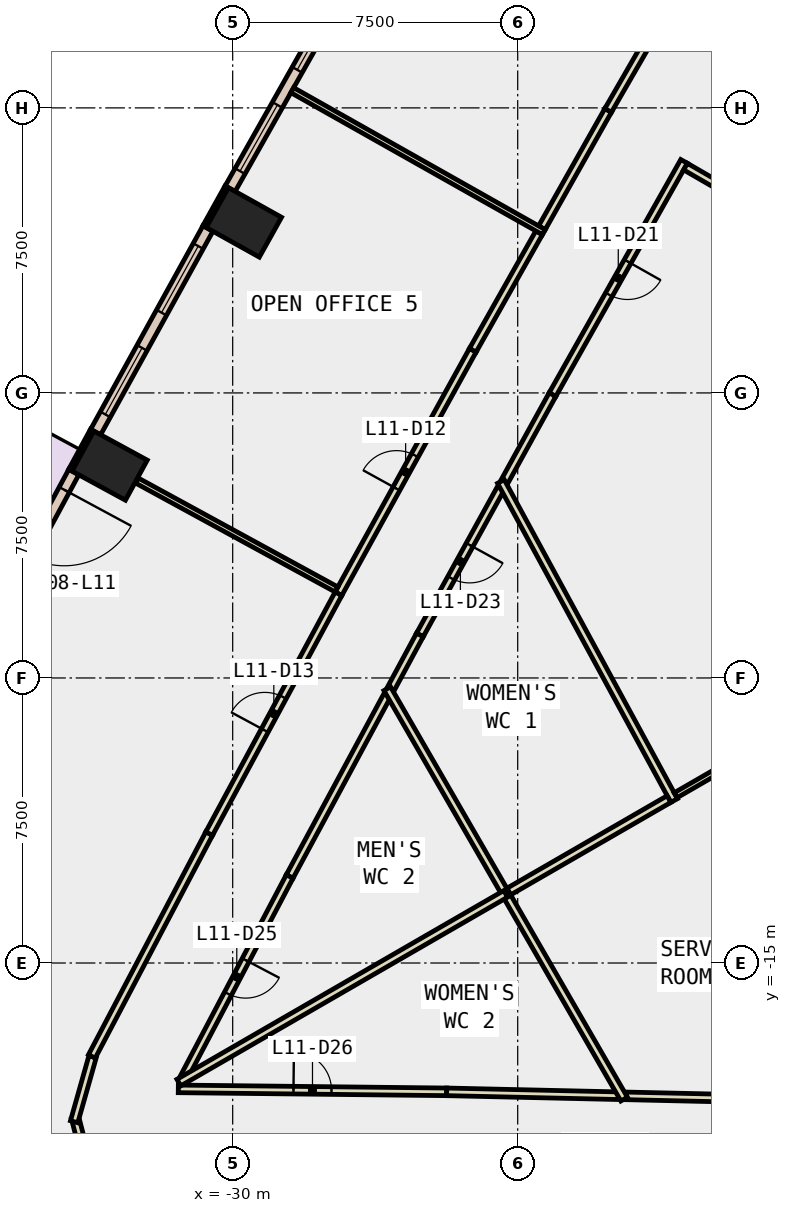
"""IFC4 building model, lengths in metres.
Left out: names, types, materials, properties, quantities, classifications, styles, units other than length and angle.
Written with IfcOpenShell. Run it as: python <this file> out.ifc"""

import sys

from ifc_helpers import new_model, si_unit, direction, frame, frame_2d, origin, origin_2d, place, context, subcontext, project, spatial, rectangle, extrude, element, fill, save


model = new_model("IFC4")
c1 = context("Model", 3, precision=1e-05, world=origin(), true_north=direction((0.0, 1.0)))
c2 = subcontext(c1, "Body", "Model", "MODEL_VIEW")
j1 = project(units=[si_unit("LENGTHUNIT", "METRE"), si_unit("PLANEANGLEUNIT", "RADIAN")], contexts=[c1])
p1 = place(None, origin())
s1 = spatial("IfcSite", under=j1, at=p1, CompositionType="ELEMENT")
p2 = place(p1, origin())
s2 = spatial("IfcBuilding", under=s1, at=p2, CompositionType="ELEMENT")
p3 = place(p2, frame((0.0, 0.0, 56.0)))
s3 = spatial("IfcBuildingStorey", under=s2, at=p3, CompositionType="ELEMENT", Elevation=56.0)
for number, where, z_axis, x_axis in (
    (1, (-29.706, 4.487, -0.4), (0.0, 0.0, 1.0), (0.487, 0.873, 0.0)),
    (2, (-33.238, -1.913, -0.4), (0.0, 0.0, 1.0), (0.478, 0.878, 0.0)),
):
    element("IfcColumn", number, at=place(p3, frame(where, z_axis=z_axis, x_axis=x_axis)), inside=s3, PredefinedType="COLUMN", context=c2, shape_type="SweptSolid", body=[
        extrude(rectangle(XDim=1.2, YDim=1.6, at=origin_2d()), origin(), (0.0, 0.0, 1.0), 4.2),
    ])
p4 = place(p3, frame((-30.156, 5.425, 0.0), z_axis=(0.0, 0.0, 1.0), x_axis=(-0.486730996044, -0.87355190887, 0.0)))
e3 = element("IfcWall", 3, at=p4, inside=s3, PredefinedType="STANDARD", context=c2, shape_type="SweptSolid", body=[
    extrude(rectangle(XDim=1.2, YDim=0.1, at=frame_2d((0.6, 0.0))), origin(), (0.0, 0.0, 1.0), 3.8),
])
p5 = place(p3, frame((-33.697, -0.98, 0.0), z_axis=(0.0, 0.0, 1.0), x_axis=(-0.478267644701, -0.878214131082, 0.0)))
e4 = element("IfcWall", 4, at=p5, inside=s3, PredefinedType="STANDARD", context=c2, shape_type="SweptSolid", body=[
    extrude(rectangle(XDim=1.2, YDim=0.1, at=frame_2d((0.6, 0.0))), origin(), (0.0, 0.0, 1.0), 3.8),
])
p6 = place(p3, frame((-27.058, 10.705, 0.0), z_axis=(0.0, 0.0, 1.0), x_axis=(-0.49151046248, -0.870871669807, 0.0)))
e5 = element("IfcWall", 5, at=p6, inside=s3, PredefinedType="STANDARD", context=c2, shape_type="SweptSolid", body=[
    extrude(rectangle(XDim=6.122, YDim=0.3, at=frame_2d((3.061, 0.0))), origin(), (0.0, 0.0, 1.0), 3.8),
])
p7 = place(p6, frame((0.53, 0.0, 0.9)))
e6 = element("IfcOpeningElement", 6, at=p7, cuts=e5, PredefinedType="OPENING", context=c2, shape_type="SweptSolid", body=[
    extrude(rectangle(XDim=2.0, YDim=2.6, at=frame_2d((1.0, 1.3))), frame((0.0, 0.16, 0.0), z_axis=(0.0, -1.0, 0.0), x_axis=(1.0, 0.0, 0.0)), (0.0, 0.0, 1.0), 0.32),
])
p8 = place(p6, frame((3.591, 0.0, 0.9)))
e7 = element("IfcOpeningElement", 7, at=p8, cuts=e5, PredefinedType="OPENING", context=c2, shape_type="SweptSolid", body=[
    extrude(rectangle(XDim=2.0, YDim=2.6, at=frame_2d((1.0, 1.3))), frame((0.0, 0.16, 0.0), z_axis=(0.0, -1.0, 0.0), x_axis=(1.0, 0.0, 0.0)), (0.0, 0.0, 1.0), 0.32),
])
p9 = place(p3, frame((-30.65, 4.328, 0.0), z_axis=(0.0, 0.0, 1.0), x_axis=(-0.483195456594, -0.875512507465, 0.0)))
e8 = element("IfcWall", 8, at=p9, inside=s3, PredefinedType="STANDARD", context=c2, shape_type="SweptSolid", body=[
    extrude(rectangle(XDim=6.12, YDim=0.3, at=frame_2d((3.06, 0.0))), origin(), (0.0, 0.0, 1.0), 3.8),
])
p10 = place(p9, frame((0.53, 0.0, 0.9)))
e9 = element("IfcOpeningElement", 9, at=p10, cuts=e8, PredefinedType="OPENING", context=c2, shape_type="SweptSolid", body=[
    extrude(rectangle(XDim=2.0, YDim=2.6, at=frame_2d((1.0, 1.3))), frame((0.0, 0.16, 0.0), z_axis=(0.0, -1.0, 0.0), x_axis=(1.0, 0.0, 0.0)), (0.0, 0.0, 1.0), 0.32),
])
p11 = place(p9, frame((3.59, 0.0, 0.9)))
e10 = element("IfcOpeningElement", 10, at=p11, cuts=e8, PredefinedType="OPENING", context=c2, shape_type="SweptSolid", body=[
    extrude(rectangle(XDim=2.0, YDim=2.6, at=frame_2d((1.0, 1.3))), frame((0.0, 0.16, 0.0), z_axis=(0.0, -1.0, 0.0), x_axis=(1.0, 0.0, 0.0)), (0.0, 0.0, 1.0), 0.32),
])
p12 = place(p3, frame((-34.181, -2.082, 0.0), z_axis=(0.0, 0.0, 1.0), x_axis=(-0.474584950749, -0.880209704856, 0.0)))
e11 = element("IfcWall", 11, at=p12, inside=s3, PredefinedType="STANDARD", context=c2, shape_type="SweptSolid", body=[
    extrude(rectangle(XDim=6.121, YDim=0.3, at=frame_2d((3.061, 0.0))), origin(), (0.0, 0.0, 1.0), 3.8),
])
p13 = place(p12, frame((0.53, 0.0, 0.0)))
e12 = element("IfcOpeningElement", 12, at=p13, cuts=e11, PredefinedType="OPENING", context=c2, shape_type="SweptSolid", body=[
    extrude(rectangle(XDim=2.0, YDim=2.4, at=frame_2d((1.0, 1.2))), frame((0.0, 0.16, 0.0), z_axis=(0.0, -1.0, 0.0), x_axis=(1.0, 0.0, 0.0)), (0.0, 0.0, 1.0), 0.32),
])
p14 = place(p12, frame((3.591, 0.0, 0.9)))
e13 = element("IfcOpeningElement", 13, at=p14, cuts=e11, PredefinedType="OPENING", context=c2, shape_type="SweptSolid", body=[
    extrude(rectangle(XDim=2.0, YDim=2.6, at=frame_2d((1.0, 1.3))), frame((0.0, 0.16, 0.0), z_axis=(0.0, -1.0, 0.0), x_axis=(1.0, 0.0, 0.0)), (0.0, 0.0, 1.0), 0.32),
])
p15 = place(p3, frame((-18.122, 6.092, 0.0), z_axis=(0.0, 0.0, 1.0), x_axis=(-0.491430359405, -0.870916874251, 0.0)))
e14 = element("IfcWall", 14, at=p15, inside=s3, PredefinedType="PARTITIONING", context=c2, shape_type="SweptSolid", body=[
    extrude(rectangle(XDim=7.047, YDim=0.2, at=frame_2d((3.523, 0.0))), origin(), (0.0, 0.0, 1.0), 3.8),
])
p16 = place(p15, frame((3.024, 0.0, 0.0)))
e15 = element("IfcOpeningElement", 15, at=p16, cuts=e14, PredefinedType="OPENING", context=c2, shape_type="SweptSolid", body=[
    extrude(rectangle(XDim=1.0, YDim=2.1, at=frame_2d((0.5, 1.05))), frame((0.0, 0.11, 0.0), z_axis=(0.0, -1.0, 0.0), x_axis=(1.0, 0.0, 0.0)), (0.0, 0.0, 1.0), 0.22),
])
p17 = place(p3, frame((-21.585, -0.045, 0.0), z_axis=(0.0, 0.0, 1.0), x_axis=(-0.483139162319, -0.875543573921, 0.0)))
e16 = element("IfcWall", 16, at=p17, inside=s3, PredefinedType="PARTITIONING", context=c2, shape_type="SweptSolid", body=[
    extrude(rectangle(XDim=2.61, YDim=0.2, at=frame_2d((1.305, 0.0))), origin(), (0.0, 0.0, 1.0), 3.8),
])
p18 = place(p3, frame((-22.942, -2.505, 0.0), z_axis=(0.0, 0.0, 1.0), x_axis=(-0.48320751977, -0.875505849688, 0.0)))
e17 = element("IfcWall", 17, at=p18, inside=s3, PredefinedType="PARTITIONING", context=c2, shape_type="SweptSolid", body=[
    extrude(rectangle(XDim=4.412, YDim=0.2, at=frame_2d((2.206, 0.0))), origin(), (0.0, 0.0, 1.0), 3.8),
])
p19 = place(p18, frame((1.706, 0.0, 0.0)))
e18 = element("IfcOpeningElement", 18, at=p19, cuts=e17, PredefinedType="OPENING", context=c2, shape_type="SweptSolid", body=[
    extrude(rectangle(XDim=1.0, YDim=2.1, at=frame_2d((0.5, 1.05))), frame((0.0, 0.11, 0.0), z_axis=(0.0, -1.0, 0.0), x_axis=(1.0, 0.0, 0.0)), (0.0, 0.0, 1.0), 0.22),
])
p20 = place(p3, frame((-25.074, -6.368, 0.0), z_axis=(0.0, 0.0, 1.0), x_axis=(-0.474616646546, -0.880192614614, 0.0)))
e19 = element("IfcWall", 19, at=p20, inside=s3, PredefinedType="PARTITIONING", context=c2, shape_type="SweptSolid", body=[
    extrude(rectangle(XDim=1.605, YDim=0.2, at=frame_2d((0.803, 0.0))), origin(), (0.0, 0.0, 1.0), 3.8),
])
p21 = place(p3, frame((-19.649, -18.496, 0.0), z_axis=(0.0, 0.0, 1.0), x_axis=(0.999744980574, -0.02258259988, 0.0)))
e20 = element("IfcWall", 20, at=p21, inside=s3, PredefinedType="PARTITIONING", context=c2, shape_type="SweptSolid", body=[
    extrude(rectangle(XDim=3.676, YDim=0.2, at=frame_2d((1.838, 0.0))), origin(), (0.0, 0.0, 1.0), 3.8),
])
p22 = place(p3, frame((-25.931, -7.957, 0.0), z_axis=(0.0, 0.0, 1.0), x_axis=(-0.474554072379, -0.880226352928, 0.0)))
e21 = element("IfcWall", 21, at=p22, inside=s3, PredefinedType="PARTITIONING", context=c2, shape_type="SweptSolid", body=[
    extrude(rectangle(XDim=5.416, YDim=0.2, at=frame_2d((2.708, 0.0))), origin(), (0.0, 0.0, 1.0), 3.8),
])
p23 = place(p3, frame((-28.501, -12.724, 0.0), z_axis=(0.0, 0.0, 1.0), x_axis=(-0.465933418625, -0.884819783576, 0.0)))
e22 = element("IfcWall", 22, at=p23, inside=s3, PredefinedType="PARTITIONING", context=c2, shape_type="SweptSolid", body=[
    extrude(rectangle(XDim=5.973, YDim=0.2, at=frame_2d((2.986, 0.0))), origin(), (0.0, 0.0, 1.0), 3.8),
])
p24 = place(p23, frame((2.486, 0.0, 0.0)))
e23 = element("IfcOpeningElement", 23, at=p24, cuts=e22, PredefinedType="OPENING", context=c2, shape_type="SweptSolid", body=[
    extrude(rectangle(XDim=1.0, YDim=2.1, at=frame_2d((0.5, 1.05))), frame((0.0, 0.11, 0.0), z_axis=(0.0, -1.0, 0.0), x_axis=(1.0, 0.0, 0.0)), (0.0, 0.0, 1.0), 0.22),
])
p25 = place(p3, frame((-31.431, -18.312, 0.0), z_axis=(0.0, 0.0, 1.0), x_axis=(0.999939195602, -0.011027470214, 0.0)))
e24 = element("IfcWall", 24, at=p25, inside=s3, PredefinedType="PARTITIONING", context=c2, shape_type="SweptSolid", body=[
    extrude(rectangle(XDim=7.062, YDim=0.2, at=frame_2d((3.531, 0.0))), origin(), (0.0, 0.0, 1.0), 3.8),
])
p26 = place(p25, frame((3.031, 0.0, 0.0)))
e25 = element("IfcOpeningElement", 25, at=p26, cuts=e24, PredefinedType="OPENING", context=c2, shape_type="SweptSolid", body=[
    extrude(rectangle(XDim=1.0, YDim=2.1, at=frame_2d((0.5, 1.05))), frame((0.0, 0.11, 0.0), z_axis=(0.0, -1.0, 0.0), x_axis=(1.0, 0.0, 0.0)), (0.0, 0.0, 1.0), 0.22),
])
p27 = place(p3, frame((-24.369, -18.39, 0.0), z_axis=(0.0, 0.0, 1.0), x_axis=(0.99974519793, -0.022572975354, 0.0)))
e26 = element("IfcWall", 26, at=p27, inside=s3, PredefinedType="PARTITIONING", context=c2, shape_type="SweptSolid", body=[
    extrude(rectangle(XDim=4.521, YDim=0.2, at=frame_2d((2.26, 0.0))), origin(), (0.0, 0.0, 1.0), 3.8),
])
p28 = place(p3, frame((-21.863, 4.345, 0.0), z_axis=(0.0, 0.0, 1.0), x_axis=(0.491394823876, 0.87093692485, 0.0)))
e27 = element("IfcWall", 27, at=p28, inside=s3, PredefinedType="PARTITIONING", context=c2, shape_type="SweptSolid", body=[
    extrude(rectangle(XDim=3.547, YDim=0.2, at=frame_2d((1.773, 0.0))), origin(), (0.0, 0.0, 1.0), 3.8),
])
p29 = place(p3, frame((-20.12, 7.434, 0.0), z_axis=(0.0, 0.0, 1.0), x_axis=(0.500039488902, 0.866002603656, 0.0)))
e28 = element("IfcWall", 28, at=p29, inside=s3, PredefinedType="PARTITIONING", context=c2, shape_type="SweptSolid", body=[
    extrude(rectangle(XDim=7.244, YDim=0.2, at=frame_2d((3.622, 0.0))), origin(), (0.0, 0.0, 1.0), 3.8),
])
p30 = place(p29, frame((3.122, 0.0, 0.0)))
e29 = element("IfcOpeningElement", 29, at=p30, cuts=e28, PredefinedType="OPENING", context=c2, shape_type="SweptSolid", body=[
    extrude(rectangle(XDim=1.0, YDim=2.1, at=frame_2d((0.5, 1.05))), frame((0.0, 0.11, 0.0), z_axis=(0.0, -1.0, 0.0), x_axis=(1.0, 0.0, 0.0)), (0.0, 0.0, 1.0), 0.22),
])
p31 = place(p3, frame((-27.217, -5.284, 0.0), z_axis=(0.0, 0.0, 1.0), x_axis=(0.483151415114, 0.875536812517, 0.0)))
e30 = element("IfcWall", 30, at=p31, inside=s3, PredefinedType="PARTITIONING", context=c2, shape_type="SweptSolid", body=[
    extrude(rectangle(XDim=7.319, YDim=0.2, at=frame_2d((3.659, 0.0))), origin(), (0.0, 0.0, 1.0), 3.8),
])
p32 = place(p31, frame((3.159, 0.0, 0.0)))
e31 = element("IfcOpeningElement", 31, at=p32, cuts=e30, PredefinedType="OPENING", context=c2, shape_type="SweptSolid", body=[
    extrude(rectangle(XDim=1.0, YDim=2.1, at=frame_2d((0.5, 1.05))), frame((0.0, 0.11, 0.0), z_axis=(0.0, -1.0, 0.0), x_axis=(1.0, 0.0, 0.0)), (0.0, 0.0, 1.0), 0.22),
])
p33 = place(p3, frame((-23.681, 1.124, 0.0), z_axis=(0.0, 0.0, 1.0), x_axis=(0.491485799319, 0.870885588965, 0.0)))
e32 = element("IfcWall", 32, at=p33, inside=s3, PredefinedType="PARTITIONING", context=c2, shape_type="SweptSolid", body=[
    extrude(rectangle(XDim=3.548, YDim=0.2, at=frame_2d((1.774, 0.0))), origin(), (0.0, 0.0, 1.0), 3.8),
])
p34 = place(p3, frame((-33.521, -20.105, 0.0), z_axis=(0.0, 0.0, 1.0), x_axis=(-0.713535335808, 0.700619243636, 0.0)))
e33 = element("IfcWall", 33, at=p34, inside=s3, PredefinedType="PARTITIONING", context=c2, shape_type="SweptSolid", body=[
    extrude(rectangle(XDim=0.775, YDim=0.2, at=frame_2d((0.387, 0.0))), origin(), (0.0, 0.0, 1.0), 3.8),
])
p35 = place(p3, frame((-34.003, -19.631, 0.0), z_axis=(0.0, 0.0, 1.0), x_axis=(-0.250111961061, 0.968216921425, 0.0)))
e34 = element("IfcWall", 34, at=p35, inside=s3, PredefinedType="PARTITIONING", context=c2, shape_type="SweptSolid", body=[
    extrude(rectangle(XDim=0.568, YDim=0.2, at=frame_2d((0.284, 0.0))), origin(), (0.0, 0.0, 1.0), 3.8),
])
p36 = place(p3, frame((-34.172, -19.177, 0.0), z_axis=(0.0, 0.0, 1.0), x_axis=(0.272780480932, 0.962076301144, 0.0)))
e35 = element("IfcWall", 35, at=p36, inside=s3, PredefinedType="PARTITIONING", context=c2, shape_type="SweptSolid", body=[
    extrude(rectangle(XDim=1.778, YDim=0.2, at=frame_2d((0.889, 0.0))), origin(), (0.0, 0.0, 1.0), 3.8),
])
p37 = place(p3, frame((-33.706, -17.458, 0.0), z_axis=(0.0, 0.0, 1.0), x_axis=(0.465905874098, 0.884834287582, 0.0)))
e36 = element("IfcWall", 36, at=p37, inside=s3, PredefinedType="PARTITIONING", context=c2, shape_type="SweptSolid", body=[
    extrude(rectangle(XDim=6.626, YDim=0.2, at=frame_2d((3.313, 0.0))), origin(), (0.0, 0.0, 1.0), 3.8),
])
p38 = place(p3, frame((-30.619, -11.595, 0.0), z_axis=(0.0, 0.0, 1.0), x_axis=(0.474595197669, 0.880204179921, 0.0)))
e37 = element("IfcWall", 37, at=p38, inside=s3, PredefinedType="PARTITIONING", context=c2, shape_type="SweptSolid", body=[
    extrude(rectangle(XDim=7.17, YDim=0.2, at=frame_2d((3.585, 0.0))), origin(), (0.0, 0.0, 1.0), 3.8),
])
p39 = place(p38, frame((3.085, 0.0, 0.0)))
e38 = element("IfcOpeningElement", 38, at=p39, cuts=e37, PredefinedType="OPENING", context=c2, shape_type="SweptSolid", body=[
    extrude(rectangle(XDim=1.0, YDim=2.1, at=frame_2d((0.5, 1.05))), frame((0.0, 0.11, 0.0), z_axis=(0.0, -1.0, 0.0), x_axis=(1.0, 0.0, 0.0)), (0.0, 0.0, 1.0), 0.22),
])
p40 = place(p3, frame((-18.384, -10.725, 0.0), z_axis=(0.0, 0.0, 1.0), x_axis=(-0.477137547132, 0.878828630119, 0.0)))
e39 = element("IfcWall", 39, at=p40, inside=s3, PredefinedType="PARTITIONING", context=c2, shape_type="SweptSolid", body=[
    extrude(rectangle(XDim=9.552, YDim=0.2, at=frame_2d((4.776, 0.0))), origin(), (0.0, 0.0, 1.0), 3.8),
])
p41 = place(p3, frame((-17.033, -9.829, 0.0), z_axis=(0.0, 0.0, 1.0), x_axis=(-0.866094414679, -0.49988045057, 0.0)))
e40 = element("IfcWall", 40, at=p41, inside=s3, PredefinedType="PARTITIONING", context=c2, shape_type="SweptSolid", body=[
    extrude(rectangle(XDim=1.516, YDim=0.15, at=frame_2d((0.758, 0.0))), origin(), (0.0, 0.0, 1.0), 3.8),
])
p42 = place(p3, frame((-18.519, -10.687, 0.0), z_axis=(0.0, 0.0, 1.0), x_axis=(-0.866063668779, -0.499933717229, 0.0)))
e41 = element("IfcWall", 41, at=p42, inside=s3, PredefinedType="PARTITIONING", context=c2, shape_type="SweptSolid", body=[
    extrude(rectangle(XDim=4.969, YDim=0.2, at=frame_2d((2.484, 0.0))), origin(), (0.0, 0.0, 1.0), 3.8),
])
p43 = place(p3, frame((-22.822, -13.171, 0.0), z_axis=(0.0, 0.0, 1.0), x_axis=(-0.499974913987, 0.866039886717, 0.0)))
e42 = element("IfcWall", 42, at=p43, inside=s3, PredefinedType="PARTITIONING", context=c2, shape_type="SweptSolid", body=[
    extrude(rectangle(XDim=6.222, YDim=0.2, at=frame_2d((3.111, 0.0))), origin(), (0.0, 0.0, 1.0), 3.8),
])
p44 = place(p3, frame((-19.699, -18.581, 0.0), z_axis=(0.0, 0.0, 1.0), x_axis=(-0.499899838407, 0.866083224385, 0.0)))
e43 = element("IfcWall", 43, at=p44, inside=s3, PredefinedType="PARTITIONING", context=c2, shape_type="SweptSolid", body=[
    extrude(rectangle(XDim=6.235, YDim=0.2, at=frame_2d((3.118, 0.0))), origin(), (0.0, 0.0, 1.0), 3.8),
])
p45 = place(p3, frame((-22.816, -13.181, 0.0), z_axis=(0.0, 0.0, 1.0), x_axis=(-0.86601529143, -0.500017514703, 0.0)))
e44 = element("IfcWall", 44, at=p45, inside=s3, PredefinedType="PARTITIONING", context=c2, shape_type="SweptSolid", body=[
    extrude(rectangle(XDim=9.932, YDim=0.2, at=frame_2d((4.966, 0.0))), origin(), (0.0, 0.0, 1.0), 3.8),
])
p46 = place(p3, frame((-21.813, 4.231, 0.0), z_axis=(0.0, 0.0, 1.0), x_axis=(-0.870901264369, 0.491458022337, 0.0)))
e45 = element("IfcWall", 45, at=p46, inside=s3, PredefinedType="PARTITIONING", context=c2, shape_type="SweptSolid", body=[
    extrude(rectangle(XDim=7.6, YDim=0.15, at=frame_2d((3.8, 0.0))), origin(), (0.0, 0.0, 1.0), 3.8),
])
p47 = place(p3, frame((-27.268, -5.171, 0.0), z_axis=(0.0, 0.0, 1.0), x_axis=(-0.877837854343, 0.478957932895, 0.0)))
e46 = element("IfcWall", 46, at=p47, inside=s3, PredefinedType="PARTITIONING", context=c2, shape_type="SweptSolid", body=[
    extrude(rectangle(XDim=5.982, YDim=0.15, at=frame_2d((2.991, 0.0))), origin(), (0.0, 0.0, 1.0), 3.8),
])
p48 = place(p3, frame((-13.85, 3.51, 0.0), z_axis=(0.0, 0.0, 1.0), x_axis=(-0.865969361037, 0.500097056325, 0.0)))
e47 = element("IfcWall", 47, at=p48, inside=s3, PredefinedType="PARTITIONING", context=c2, shape_type="SweptSolid", body=[
    extrude(rectangle(XDim=4.889, YDim=0.2, at=frame_2d((2.445, 0.0))), origin(), (0.0, 0.0, 1.0), 3.8),
])
p49 = place(p7, origin())
e48 = element("IfcWindow", 48, at=p49, inside=s3, PartitioningType="SINGLE_PANEL", PredefinedType="WINDOW", context=c2, shape_type="SweptSolid", body=[
    extrude(rectangle(XDim=2.0, YDim=2.6, at=frame_2d((1.0, 1.3))), frame((0.0, 0.03, 0.0), z_axis=(0.0, -1.0, 0.0), x_axis=(1.0, 0.0, 0.0)), (0.0, 0.0, 1.0), 0.06),
])
fill(e6, e48)
p50 = place(p8, origin())
e49 = element("IfcWindow", 49, at=p50, inside=s3, PartitioningType="SINGLE_PANEL", PredefinedType="WINDOW", context=c2, shape_type="SweptSolid", body=[
    extrude(rectangle(XDim=2.0, YDim=2.6, at=frame_2d((1.0, 1.3))), frame((0.0, 0.03, 0.0), z_axis=(0.0, -1.0, 0.0), x_axis=(1.0, 0.0, 0.0)), (0.0, 0.0, 1.0), 0.06),
])
fill(e7, e49)
p51 = place(p10, origin())
e50 = element("IfcWindow", 50, at=p51, inside=s3, PartitioningType="SINGLE_PANEL", PredefinedType="WINDOW", context=c2, shape_type="SweptSolid", body=[
    extrude(rectangle(XDim=2.0, YDim=2.6, at=frame_2d((1.0, 1.3))), frame((0.0, 0.03, 0.0), z_axis=(0.0, -1.0, 0.0), x_axis=(1.0, 0.0, 0.0)), (0.0, 0.0, 1.0), 0.06),
])
fill(e9, e50)
p52 = place(p11, origin())
e51 = element("IfcWindow", 51, at=p52, inside=s3, PartitioningType="SINGLE_PANEL", PredefinedType="WINDOW", context=c2, shape_type="SweptSolid", body=[
    extrude(rectangle(XDim=2.0, YDim=2.6, at=frame_2d((1.0, 1.3))), frame((0.0, 0.03, 0.0), z_axis=(0.0, -1.0, 0.0), x_axis=(1.0, 0.0, 0.0)), (0.0, 0.0, 1.0), 0.06),
])
fill(e10, e51)
p53 = place(p13, origin())
e52 = element("IfcDoor", 52, at=p53, inside=s3, OperationType="SLIDING_TO_LEFT", PredefinedType="DOOR", context=c2, shape_type="SweptSolid", body=[
    extrude(rectangle(XDim=2.0, YDim=2.4, at=frame_2d((1.0, 1.2))), frame((0.0, 0.025, 0.0), z_axis=(0.0, -1.0, 0.0), x_axis=(1.0, 0.0, 0.0)), (0.0, 0.0, 1.0), 0.05),
])
fill(e12, e52)
p54 = place(p32, origin())
e53 = element("IfcDoor", 53, at=p54, inside=s3, OperationType="SINGLE_SWING_LEFT", PredefinedType="DOOR", context=c2, shape_type="SweptSolid", body=[
    extrude(rectangle(XDim=1.0, YDim=2.1, at=frame_2d((0.5, 1.05))), frame((0.0, 0.025, 0.0), z_axis=(0.0, -1.0, 0.0), x_axis=(1.0, 0.0, 0.0)), (0.0, 0.0, 1.0), 0.05),
])
fill(e31, e53)
p55 = place(p39, origin())
e54 = element("IfcDoor", 54, at=p55, inside=s3, OperationType="SINGLE_SWING_LEFT", PredefinedType="DOOR", context=c2, shape_type="SweptSolid", body=[
    extrude(rectangle(XDim=1.0, YDim=2.1, at=frame_2d((0.5, 1.05))), frame((0.0, 0.025, 0.0), z_axis=(0.0, -1.0, 0.0), x_axis=(1.0, 0.0, 0.0)), (0.0, 0.0, 1.0), 0.05),
])
fill(e38, e54)
p56 = place(p16, origin())
e55 = element("IfcDoor", 55, at=p56, inside=s3, OperationType="SINGLE_SWING_LEFT", PredefinedType="DOOR", context=c2, shape_type="SweptSolid", body=[
    extrude(rectangle(XDim=1.0, YDim=2.1, at=frame_2d((0.5, 1.05))), frame((0.0, 0.025, 0.0), z_axis=(0.0, -1.0, 0.0), x_axis=(1.0, 0.0, 0.0)), (0.0, 0.0, 1.0), 0.05),
])
fill(e15, e55)
p57 = place(p19, origin())
e56 = element("IfcDoor", 56, at=p57, inside=s3, OperationType="SINGLE_SWING_LEFT", PredefinedType="DOOR", context=c2, shape_type="SweptSolid", body=[
    extrude(rectangle(XDim=1.0, YDim=2.1, at=frame_2d((0.5, 1.05))), frame((0.0, 0.025, 0.0), z_axis=(0.0, -1.0, 0.0), x_axis=(1.0, 0.0, 0.0)), (0.0, 0.0, 1.0), 0.05),
])
fill(e18, e56)
p58 = place(p24, origin())
e57 = element("IfcDoor", 57, at=p58, inside=s3, OperationType="SINGLE_SWING_LEFT", PredefinedType="DOOR", context=c2, shape_type="SweptSolid", body=[
    extrude(rectangle(XDim=1.0, YDim=2.1, at=frame_2d((0.5, 1.05))), frame((0.0, 0.025, 0.0), z_axis=(0.0, -1.0, 0.0), x_axis=(1.0, 0.0, 0.0)), (0.0, 0.0, 1.0), 0.05),
])
fill(e23, e57)
p59 = place(p26, origin())
e58 = element("IfcDoor", 58, at=p59, inside=s3, OperationType="SINGLE_SWING_LEFT", PredefinedType="DOOR", context=c2, shape_type="SweptSolid", body=[
    extrude(rectangle(XDim=1.0, YDim=2.1, at=frame_2d((0.5, 1.05))), frame((0.0, 0.025, 0.0), z_axis=(0.0, -1.0, 0.0), x_axis=(1.0, 0.0, 0.0)), (0.0, 0.0, 1.0), 0.05),
])
fill(e25, e58)
save(model, sys.argv[1])
